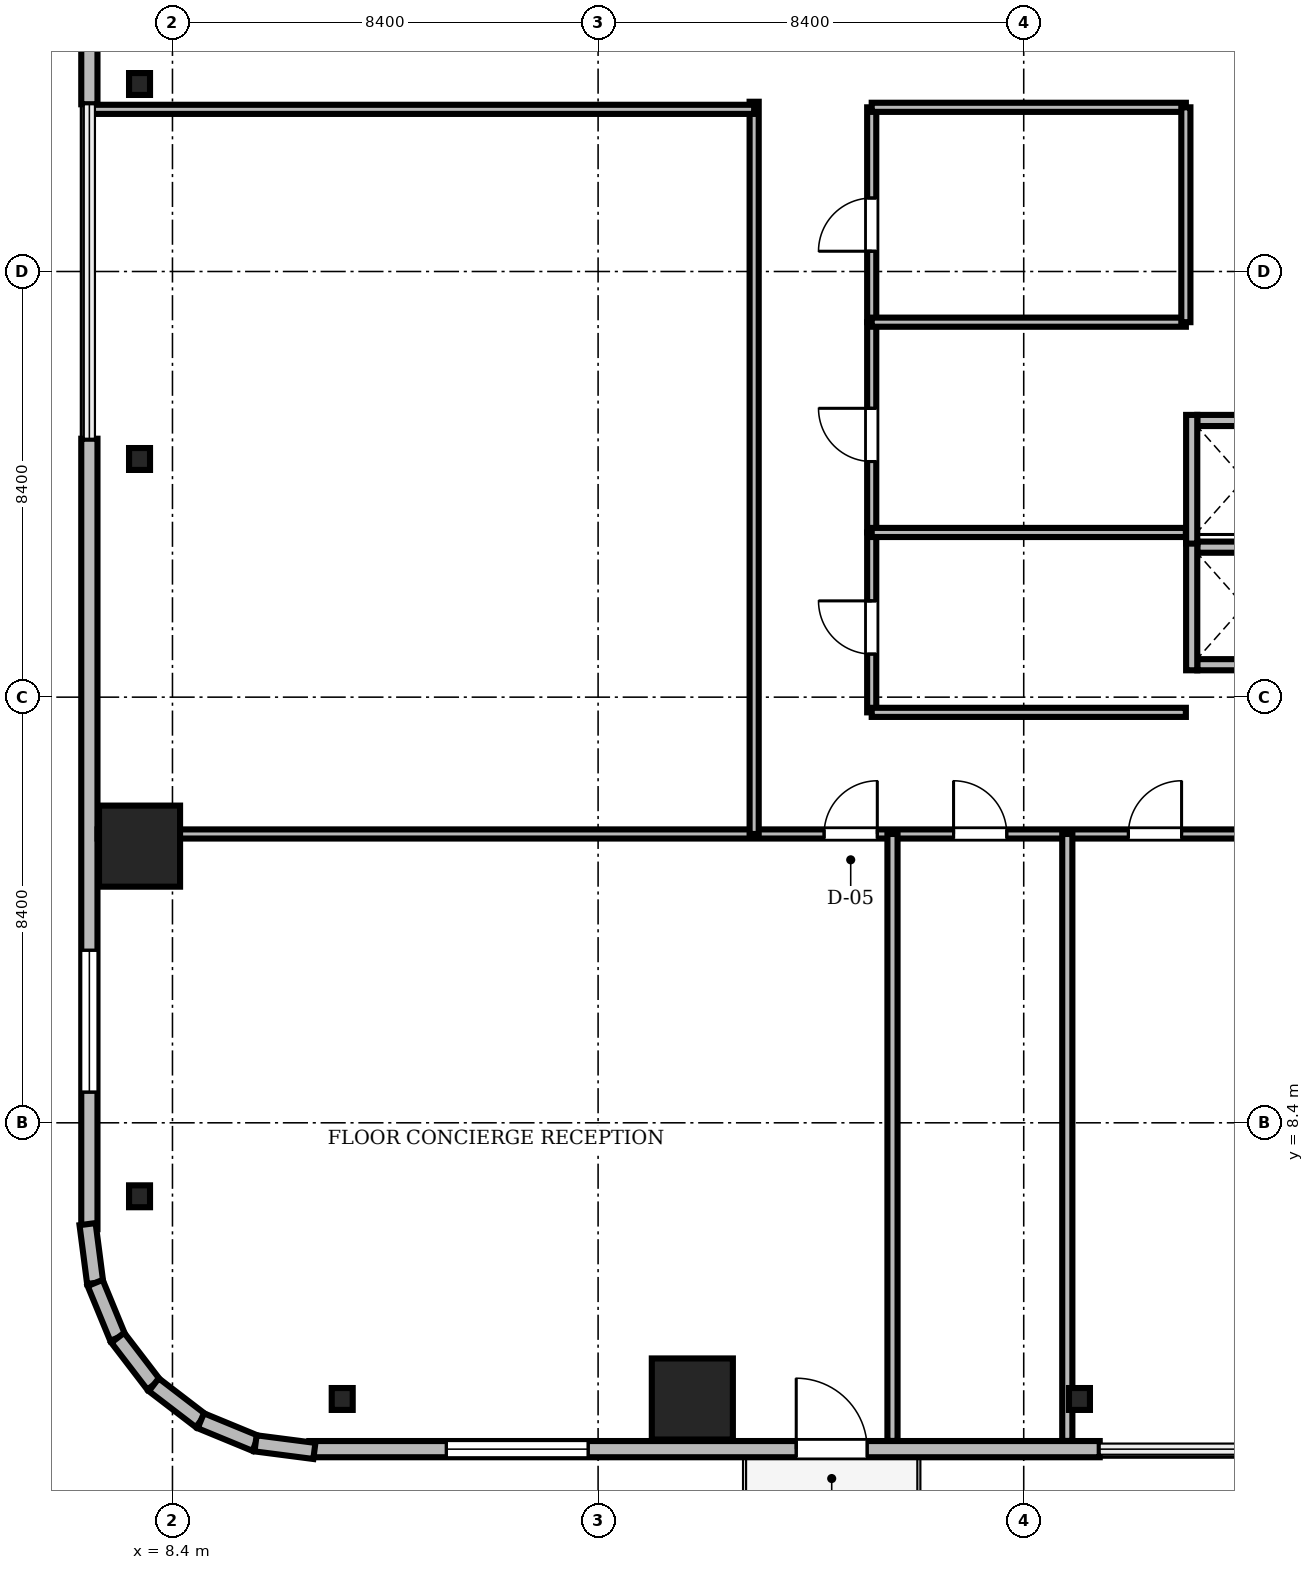
"""IFC4 building model, lengths in metres.
Left out: names, types, materials, properties, quantities, classifications, styles, units other than length and angle.
Written with IfcOpenShell. Run it as: python <this file> out.ifc"""

import sys

from ifc_helpers import new_model, si_unit, direction, frame, frame_2d, origin, origin_2d, place, context, subcontext, project, spatial, rectangle, i_section, extrude, source, transform, mapped, element, fill, save


model = new_model("IFC4")
c1 = context("Model", 3, precision=1e-05, world=origin(), true_north=direction((0.0, 1.0)))
c2 = subcontext(c1, "Body", "Model", "MODEL_VIEW")
j1 = project(units=[si_unit("LENGTHUNIT", "METRE"), si_unit("PLANEANGLEUNIT", "RADIAN")], contexts=[c1])
p1 = place(None, origin())
s1 = spatial("IfcSite", under=j1, at=p1, CompositionType="ELEMENT")
p2 = place(p1, origin())
s2 = spatial("IfcBuilding", under=s1, at=p2, CompositionType="ELEMENT")
p3 = place(p2, frame((0.0, 0.0, 126.1)))
s3 = spatial("IfcBuildingStorey", under=s2, at=p3, CompositionType="ELEMENT", Elevation=126.1)
m1 = source(origin(), c2, "Body", "SweptSolid", [
    extrude(rectangle(XDim=1.6, YDim=1.6, at=origin_2d()), origin(), (0.0, 0.0, 1.0), 3.46),
])
for number, where, z_axis, x_axis in (
    (1, (18.66, 2.95, 0.0), (0.0, 0.0, 1.0), (1.0, 0.0, 0.0)),
    (2, (7.75, 13.86, 0.0), (0.0, 0.0, 1.0), (1.0, 0.0, 0.0)),
):
    element("IfcColumn", number, at=place(p3, frame(where, z_axis=z_axis, x_axis=x_axis)), inside=s3, PredefinedType="COLUMN", context=c2, shape_type="MappedRepresentation", body=[
        mapped(m1, transform((0.0, 0.0, 0.0), scale=1.0)),
    ])
m2 = source(origin(), c2, "Body", "SweptSolid", [
    extrude(i_section(OverallWidth=0.414, OverallDepth=0.432, WebThickness=0.026, FlangeThickness=0.04, FilletRadius=0.015, at=origin_2d()), origin(), (0.0, 0.0, 1.0), 3.46),
])
for number, where, z_axis, x_axis in (
    (3, (11.75, 2.95, 0.0), (0.0, 0.0, 1.0), (1.0, 0.0, 0.0)),
    (4, (26.3, 2.95, 0.0), (0.0, 0.0, 1.0), (1.0, 0.0, 0.0)),
    (5, (7.75, 28.9, 0.0), (0.0, 0.0, 1.0), (1.0, 0.0, 0.0)),
    (6, (7.75, 21.5, 0.0), (0.0, 0.0, 1.0), (1.0, 0.0, 0.0)),
    (7, (7.75, 6.95, 0.0), (0.0, 0.0, 1.0), (1.0, 0.0, 0.0)),
):
    element("IfcColumn", number, at=place(p3, frame(where, z_axis=z_axis, x_axis=x_axis)), inside=s3, PredefinedType="COLUMN", context=c2, shape_type="MappedRepresentation", body=[
        mapped(m2, transform((0.0, 0.0, 0.0), scale=1.0)),
    ])
m3 = source(origin(), c2, "Body", "SweptSolid", [
    extrude(rectangle(XDim=15.6, YDim=0.32, at=frame_2d((7.8, 0.0))), origin(), (0.0, 0.0, 1.0), 3.46),
])
p4 = place(p3, frame((11.1, 1.96, 0.0), z_axis=(0.0, 0.0, 1.0), x_axis=(1.0, 0.0, 0.0)))
e8 = element("IfcWall", 8, at=p4, inside=s3, PredefinedType="SOLIDWALL", context=c2, shape_type="MappedRepresentation", body=[
    mapped(m3, transform((0.0, 0.0, 0.0), scale=1.0)),
])
m4 = source(origin(), c2, "Body", "SweptSolid", [
    extrude(rectangle(XDim=1.4, YDim=2.3, at=frame_2d((0.7, 1.15))), frame((0.0, 0.17, 0.0), z_axis=(0.0, -1.0, 0.0), x_axis=(1.0, 0.0, 0.0)), (0.0, 0.0, 1.0), 0.34),
])
p5 = place(p4, frame((9.61, 0.0, 0.0)))
e9 = element("IfcOpeningElement", 9, at=p5, cuts=e8, PredefinedType="OPENING", context=c2, shape_type="MappedRepresentation", body=[
    mapped(m4, transform((0.0, 0.0, 0.0), scale=1.0)),
])
m5 = source(origin(), c2, "Body", "SweptSolid", [
    extrude(rectangle(XDim=2.8, YDim=2.4, at=frame_2d((1.4, 1.2))), frame((0.0, 0.17, 0.0), z_axis=(0.0, -1.0, 0.0), x_axis=(1.0, 0.0, 0.0)), (0.0, 0.0, 1.0), 0.34),
])
p6 = place(p4, frame((2.705, 0.0, 0.72)))
e10 = element("IfcOpeningElement", 10, at=p6, cuts=e8, PredefinedType="OPENING", context=c2, shape_type="MappedRepresentation", body=[
    mapped(m5, transform((0.0, 0.0, 0.0), scale=1.0)),
])
m6 = source(origin(), c2, "Body", "SweptSolid", [
    extrude(rectangle(XDim=15.6, YDim=0.32, at=frame_2d((7.8, 0.0))), origin(), (0.0, 0.0, 1.0), 3.46),
])
p7 = place(p3, frame((6.76, 44.1, 0.0), z_axis=(0.0, 0.0, 1.0), x_axis=(0.0, -1.0, 0.0)))
e11 = element("IfcWall", 11, at=p7, inside=s3, PredefinedType="SOLIDWALL", context=c2, shape_type="MappedRepresentation", body=[
    mapped(m6, transform((0.0, 0.0, 0.0), scale=1.0)),
])
p8 = place(p7, frame((9.61, 0.0, 0.0)))
e12 = element("IfcOpeningElement", 12, at=p8, cuts=e11, PredefinedType="OPENING", context=c2, shape_type="MappedRepresentation", body=[
    mapped(m4, transform((0.0, 0.0, 0.0), scale=1.0)),
])
p9 = place(p7, frame((2.705, 0.0, 0.72)))
e13 = element("IfcOpeningElement", 13, at=p9, cuts=e11, PredefinedType="OPENING", context=c2, shape_type="MappedRepresentation", body=[
    mapped(m5, transform((0.0, 0.0, 0.0), scale=1.0)),
])
p10 = place(p3, frame((6.76, 21.9, 0.0), z_axis=(0.0, 0.0, 1.0), x_axis=(0.0, -1.0, 0.0)))
e14 = element("IfcWall", 14, at=p10, inside=s3, PredefinedType="SOLIDWALL", context=c2, shape_type="MappedRepresentation", body=[
    mapped(m3, transform((0.0, 0.0, 0.0), scale=1.0)),
])
p11 = place(p10, frame((10.095, 0.0, 0.72)))
e15 = element("IfcOpeningElement", 15, at=p11, cuts=e14, PredefinedType="OPENING", context=c2, shape_type="MappedRepresentation", body=[
    mapped(m5, transform((0.0, 0.0, 0.0), scale=1.0)),
])
m7 = source(origin(), c2, "Body", "SweptSolid", [
    extrude(rectangle(XDim=1.171, YDim=0.32, at=frame_2d((0.585, 0.0))), origin(), (0.0, 0.0, 1.0), 3.46),
])
p12 = place(p3, frame((6.724, 6.401, 0.0), z_axis=(0.0, 0.0, 1.0), x_axis=(0.128269133229, -0.991739395941, 0.0)))
e16 = element("IfcWall", 16, at=p12, inside=s3, PredefinedType="SOLIDWALL", context=c2, shape_type="MappedRepresentation", body=[
    mapped(m7, transform((0.0, 0.0, 0.0), scale=1.0)),
])
m8 = source(origin(), c2, "Body", "SweptSolid", [
    extrude(rectangle(XDim=1.169, YDim=0.32, at=frame_2d((0.584, 0.0))), origin(), (0.0, 0.0, 1.0), 3.46),
])
for number, where, z_axis, x_axis in (
    (17, (6.875, 5.24, 0.0), (0.0, 0.0, 1.0), (0.381, -0.925, 0.0)),
    (18, (7.32, 4.159, 0.0), (0.0, 0.0, 1.0), (0.608, -0.794, 0.0)),
):
    element("IfcWall", number, at=place(p3, frame(where, z_axis=z_axis, x_axis=x_axis)), inside=s3, PredefinedType="SOLIDWALL", context=c2, shape_type="MappedRepresentation", body=[
        mapped(m8, transform((0.0, 0.0, 0.0), scale=1.0)),
    ])
m9 = source(origin(), c2, "Body", "SweptSolid", [
    extrude(rectangle(XDim=1.169, YDim=0.32, at=frame_2d((0.584, 0.0))), origin(), (0.0, 0.0, 1.0), 3.46),
])
p13 = place(p3, frame((8.031, 3.231, 0.0), z_axis=(0.0, 0.0, 1.0), x_axis=(0.793663520347, -0.608356981114, 0.0)))
e19 = element("IfcWall", 19, at=p13, inside=s3, PredefinedType="SOLIDWALL", context=c2, shape_type="MappedRepresentation", body=[
    mapped(m9, transform((0.0, 0.0, 0.0), scale=1.0)),
])
m10 = source(origin(), c2, "Body", "SweptSolid", [
    extrude(rectangle(XDim=1.169, YDim=0.32, at=frame_2d((0.585, 0.0))), origin(), (0.0, 0.0, 1.0), 3.46),
])
p14 = place(p3, frame((8.959, 2.52, 0.0), z_axis=(0.0, 0.0, 1.0), x_axis=(0.924479075121, -0.381232789334, 0.0)))
e20 = element("IfcWall", 20, at=p14, inside=s3, PredefinedType="SOLIDWALL", context=c2, shape_type="MappedRepresentation", body=[
    mapped(m10, transform((0.0, 0.0, 0.0), scale=1.0)),
])
m11 = source(origin(), c2, "Body", "SweptSolid", [
    extrude(rectangle(XDim=1.17, YDim=0.32, at=frame_2d((0.585, 0.0))), origin(), (0.0, 0.0, 1.0), 3.46),
])
p15 = place(p3, frame((10.04, 2.074, 0.0), z_axis=(0.0, 0.0, 1.0), x_axis=(0.991762485493, -0.128090485085, 0.0)))
e21 = element("IfcWall", 21, at=p15, inside=s3, PredefinedType="SOLIDWALL", context=c2, shape_type="MappedRepresentation", body=[
    mapped(m11, transform((0.0, 0.0, 0.0), scale=1.0)),
])
m12 = source(origin(), c2, "Body", "SweptSolid", [
    extrude(rectangle(XDim=1.85, YDim=0.22, at=frame_2d((0.925, 0.0))), origin(), (0.0, 0.0, 1.0), 3.46),
])
for number, where, z_axis, x_axis in (
    (22, (28.625, 17.44, 0.0), (0.0, 0.0, 1.0), (1.0, 0.0, 0.0)),
    (23, (28.625, 19.76, 0.0), (0.0, 0.0, 1.0), (1.0, 0.0, 0.0)),
):
    element("IfcWall", number, at=place(p3, frame(where, z_axis=z_axis, x_axis=x_axis)), inside=s3, PredefinedType="SOLIDWALL", context=c2, shape_type="MappedRepresentation", body=[
        mapped(m12, transform((0.0, 0.0, 0.0), scale=1.0)),
    ])
m13 = source(origin(), c2, "Body", "SweptSolid", [
    extrude(rectangle(XDim=2.54, YDim=0.22, at=frame_2d((1.27, 0.0))), origin(), (0.0, 0.0, 1.0), 3.46),
])
p16 = place(p3, frame((28.515, 17.33, 0.0), z_axis=(0.0, 0.0, 1.0), x_axis=(0.0, 1.0, 0.0)))
e24 = element("IfcWall", 24, at=p16, inside=s3, PredefinedType="SOLIDWALL", context=c2, shape_type="MappedRepresentation", body=[
    mapped(m13, transform((0.0, 0.0, 0.0), scale=1.0)),
])
p17 = place(p3, frame((28.625, 22.26, 0.0), z_axis=(0.0, 0.0, 1.0), x_axis=(1.0, 0.0, 0.0)))
e25 = element("IfcWall", 25, at=p17, inside=s3, PredefinedType="SOLIDWALL", context=c2, shape_type="MappedRepresentation", body=[
    mapped(m12, transform((0.0, 0.0, 0.0), scale=1.0)),
])
p18 = place(p3, frame((28.515, 19.83, 0.0), z_axis=(0.0, 0.0, 1.0), x_axis=(0.0, 1.0, 0.0)))
e26 = element("IfcWall", 26, at=p18, inside=s3, PredefinedType="SOLIDWALL", context=c2, shape_type="MappedRepresentation", body=[
    mapped(m13, transform((0.0, 0.0, 0.0), scale=1.0)),
])
m14 = source(origin(), c2, "Body", "SweptSolid", [
    extrude(rectangle(XDim=46.156, YDim=0.18, at=frame_2d((23.078, 0.0))), origin(), (0.0, 0.0, 1.0), 2.702),
])
p19 = place(p3, frame((6.922, 14.1, 0.0), z_axis=(0.0, 0.0, 1.0), x_axis=(1.0, 0.0, 0.0)))
e27 = element("IfcWall", 27, at=p19, inside=s3, PredefinedType="PARTITIONING", context=c2, shape_type="MappedRepresentation", body=[
    mapped(m14, transform((0.0, 0.0, 0.0), scale=1.0)),
])
m15 = source(origin(), c2, "Body", "SweptSolid", [
    extrude(rectangle(XDim=1.05, YDim=2.2, at=frame_2d((0.525, 1.1))), frame((0.0, 0.1, 0.0), z_axis=(0.0, -1.0, 0.0), x_axis=(1.0, 0.0, 0.0)), (0.0, 0.0, 1.0), 0.2),
])
p20 = place(p19, frame((14.338, 0.0, 0.0)))
e28 = element("IfcOpeningElement", 28, at=p20, cuts=e27, PredefinedType="OPENING", context=c2, shape_type="MappedRepresentation", body=[
    mapped(m15, transform((0.0, 0.0, 0.0), scale=1.0)),
])
p21 = place(p19, frame((16.893, 0.0, 0.0)))
e29 = element("IfcOpeningElement", 29, at=p21, cuts=e27, PredefinedType="OPENING", context=c2, shape_type="MappedRepresentation", body=[
    mapped(m15, transform((0.0, 0.0, 0.0), scale=1.0)),
])
p22 = place(p19, frame((20.344, 0.0, 0.0)))
e30 = element("IfcOpeningElement", 30, at=p22, cuts=e27, PredefinedType="OPENING", context=c2, shape_type="MappedRepresentation", body=[
    mapped(m15, transform((0.0, 0.0, 0.0), scale=1.0)),
])
p23 = place(p19, frame((23.948, 0.0, 0.0)))
e31 = element("IfcOpeningElement", 31, at=p23, cuts=e27, PredefinedType="OPENING", context=c2, shape_type="MappedRepresentation", body=[
    mapped(m15, transform((0.0, 0.0, 0.0), scale=1.0)),
])
p24 = place(p19, frame((27.913, 0.0, 0.0)))
e32 = element("IfcOpeningElement", 32, at=p24, cuts=e27, PredefinedType="OPENING", context=c2, shape_type="MappedRepresentation", body=[
    mapped(m15, transform((0.0, 0.0, 0.0), scale=1.0)),
])
p25 = place(p19, frame((32.086, 0.0, 0.0)))
e33 = element("IfcOpeningElement", 33, at=p25, cuts=e27, PredefinedType="OPENING", context=c2, shape_type="MappedRepresentation", body=[
    mapped(m15, transform((0.0, 0.0, 0.0), scale=1.0)),
])
m16 = source(origin(), c2, "Body", "SweptSolid", [
    extrude(rectangle(XDim=0.95, YDim=2.15, at=frame_2d((0.475, 1.075))), frame((0.0, 0.1, 0.0), z_axis=(0.0, -1.0, 0.0), x_axis=(1.0, 0.0, 0.0)), (0.0, 0.0, 1.0), 0.2),
])
p26 = place(p19, frame((38.234, 0.0, 0.0)))
e34 = element("IfcOpeningElement", 34, at=p26, cuts=e27, PredefinedType="OPENING", context=c2, shape_type="MappedRepresentation", body=[
    mapped(m16, transform((0.0, 0.0, 0.0), scale=1.0)),
])
p27 = place(p19, frame((41.828, 0.0, 0.0)))
e35 = element("IfcOpeningElement", 35, at=p27, cuts=e27, PredefinedType="OPENING", context=c2, shape_type="MappedRepresentation", body=[
    mapped(m15, transform((0.0, 0.0, 0.0), scale=1.0)),
])
m17 = source(origin(), c2, "Body", "SweptSolid", [
    extrude(rectangle(XDim=4.24, YDim=0.18, at=frame_2d((2.12, 0.0))), origin(), (0.0, 0.0, 1.0), 2.852),
])
p28 = place(p3, frame((22.2, 24.2, 0.0), z_axis=(0.0, 0.0, 1.0), x_axis=(0.0, 1.0, 0.0)))
e36 = element("IfcWall", 36, at=p28, inside=s3, PredefinedType="PARTITIONING", context=c2, shape_type="MappedRepresentation", body=[
    mapped(m17, transform((0.0, 0.0, 0.0), scale=1.0)),
])
p29 = place(p28, frame((1.4, 0.0, 0.0)))
e37 = element("IfcOpeningElement", 37, at=p29, cuts=e36, PredefinedType="OPENING", context=c2, shape_type="MappedRepresentation", body=[
    mapped(m15, transform((0.0, 0.0, 0.0), scale=1.0)),
])
m18 = source(origin(), c2, "Body", "SweptSolid", [
    extrude(rectangle(XDim=4.15, YDim=0.18, at=frame_2d((2.075, 0.0))), origin(), (0.0, 0.0, 1.0), 3.122),
])
p30 = place(p3, frame((22.2, 20.05, 0.0), z_axis=(0.0, 0.0, 1.0), x_axis=(0.0, 1.0, 0.0)))
e38 = element("IfcWall", 38, at=p30, inside=s3, PredefinedType="PARTITIONING", context=c2, shape_type="MappedRepresentation", body=[
    mapped(m18, transform((0.0, 0.0, 0.0), scale=1.0)),
])
p31 = place(p30, frame((1.4, 0.0, 0.0)))
e39 = element("IfcOpeningElement", 39, at=p31, cuts=e38, PredefinedType="OPENING", context=c2, shape_type="MappedRepresentation", body=[
    mapped(m15, transform((0.0, 0.0, 0.0), scale=1.0)),
])
m19 = source(origin(), c2, "Body", "SweptSolid", [
    extrude(rectangle(XDim=3.55, YDim=0.18, at=frame_2d((1.775, 0.0))), origin(), (0.0, 0.0, 1.0), 2.852),
])
p32 = place(p3, frame((22.2, 16.5, 0.0), z_axis=(0.0, 0.0, 1.0), x_axis=(0.0, 1.0, 0.0)))
e40 = element("IfcWall", 40, at=p32, inside=s3, PredefinedType="PARTITIONING", context=c2, shape_type="MappedRepresentation", body=[
    mapped(m19, transform((0.0, 0.0, 0.0), scale=1.0)),
])
p33 = place(p32, frame((1.15, 0.0, 0.0)))
e41 = element("IfcOpeningElement", 41, at=p33, cuts=e40, PredefinedType="OPENING", context=c2, shape_type="MappedRepresentation", body=[
    mapped(m15, transform((0.0, 0.0, 0.0), scale=1.0)),
])
m20 = source(origin(), c2, "Body", "SweptSolid", [
    extrude(rectangle(XDim=14.45, YDim=0.18, at=frame_2d((7.225, 0.0))), origin(), (0.0, 0.0, 1.0), 2.852),
])
p34 = place(p3, frame((19.88, 14.1, 0.0), z_axis=(0.0, 0.0, 1.0), x_axis=(0.0, 1.0, 0.0)))
e42 = element("IfcWall", 42, at=p34, inside=s3, PredefinedType="PARTITIONING", context=c2, shape_type="MappedRepresentation", body=[
    mapped(m20, transform((0.0, 0.0, 0.0), scale=1.0)),
])
m21 = source(origin(), c2, "Body", "SweptSolid", [
    extrude(rectangle(XDim=13.15, YDim=0.18, at=frame_2d((6.575, 0.0))), origin(), (0.0, 0.0, 1.0), 2.702),
])
p35 = place(p3, frame((6.73, 28.4, 0.0), z_axis=(0.0, 0.0, 1.0), x_axis=(1.0, 0.0, 0.0)))
e43 = element("IfcWall", 43, at=p35, inside=s3, PredefinedType="PARTITIONING", context=c2, shape_type="MappedRepresentation", body=[
    mapped(m21, transform((0.0, 0.0, 0.0), scale=1.0)),
])
m22 = source(origin(), c2, "Body", "SweptSolid", [
    extrude(rectangle(XDim=11.978, YDim=0.2, at=frame_2d((5.989, 0.0))), origin(), (0.0, 0.0, 1.0), 2.702),
])
for number, where, z_axis, x_axis in (
    (44, (22.61, 2.122, 0.0), (0.0, 0.0, 1.0), (0.0, 1.0, 0.0)),
    (45, (26.06, 2.122, 0.0), (0.0, 0.0, 1.0), (0.0, 1.0, 0.0)),
):
    element("IfcWall", number, at=place(p3, frame(where, z_axis=z_axis, x_axis=x_axis)), inside=s3, PredefinedType="PARTITIONING", context=c2, shape_type="MappedRepresentation", body=[
        mapped(m22, transform((0.0, 0.0, 0.0), scale=1.0)),
    ])
m23 = source(origin(), c2, "Body", "SweptSolid", [
    extrude(rectangle(XDim=6.2, YDim=0.18, at=frame_2d((3.1, 0.0))), origin(), (0.0, 0.0, 1.0), 3.46),
])
for number, where, z_axis, x_axis in (
    (46, (22.2, 16.5, 0.0), (0.0, 0.0, 1.0), (1.0, 0.0, 0.0)),
    (47, (22.2, 20.05, 0.0), (0.0, 0.0, 1.0), (1.0, 0.0, 0.0)),
    (48, (22.2, 24.2, 0.0), (0.0, 0.0, 1.0), (1.0, 0.0, 0.0)),
    (49, (22.2, 28.44, 0.0), (0.0, 0.0, 1.0), (1.0, 0.0, 0.0)),
):
    element("IfcWall", number, at=place(p3, frame(where, z_axis=z_axis, x_axis=x_axis)), inside=s3, PredefinedType="PARTITIONING", context=c2, shape_type="MappedRepresentation", body=[
        mapped(m23, transform((0.0, 0.0, 0.0), scale=1.0)),
    ])
p36 = place(p3, frame((28.4, 24.2, 0.0), z_axis=(0.0, 0.0, 1.0), x_axis=(0.0, 1.0, 0.0)))
e50 = element("IfcWall", 50, at=p36, inside=s3, PredefinedType="PARTITIONING", context=c2, shape_type="MappedRepresentation", body=[
    mapped(m17, transform((0.0, 0.0, 0.0), scale=1.0)),
])
m24 = source(origin(), c2, "Body", "SweptSolid", [
    extrude(rectangle(XDim=1.4, YDim=2.3, at=frame_2d((0.7, 1.15))), frame((0.0, 0.025, 0.0), z_axis=(0.0, -1.0, 0.0), x_axis=(1.0, 0.0, 0.0)), (0.0, 0.0, 1.0), 0.05),
])
p37 = place(p5, frame((1.4, 0.0, 0.0), z_axis=(0.0, 0.0, 1.0), x_axis=(-1.0, 0.0, 0.0)))
e51 = element("IfcDoor", 51, at=p37, inside=s3, OperationType="DOUBLE_DOOR_SLIDING", PredefinedType="DOOR", context=c2, shape_type="MappedRepresentation", body=[
    mapped(m24, transform((0.0, 0.0, 0.0), scale=1.0)),
])
fill(e9, e51)
m25 = source(origin(), c2, "Body", "SweptSolid", [
    extrude(rectangle(XDim=2.8, YDim=2.4, at=frame_2d((1.4, 1.2))), frame((0.0, 0.03, 0.0), z_axis=(0.0, -1.0, 0.0), x_axis=(1.0, 0.0, 0.0)), (0.0, 0.0, 1.0), 0.06),
])
p38 = place(p6, origin())
e52 = element("IfcWindow", 52, at=p38, inside=s3, PartitioningType="SINGLE_PANEL", PredefinedType="WINDOW", context=c2, shape_type="MappedRepresentation", body=[
    mapped(m25, transform((0.0, 0.0, 0.0), scale=1.0)),
])
fill(e10, e52)
p39 = place(p11, origin())
e53 = element("IfcWindow", 53, at=p39, inside=s3, PartitioningType="SINGLE_PANEL", PredefinedType="WINDOW", context=c2, shape_type="MappedRepresentation", body=[
    mapped(m25, transform((0.0, 0.0, 0.0), scale=1.0)),
])
fill(e15, e53)
m26 = source(origin(), c2, "Body", "SweptSolid", [
    extrude(rectangle(XDim=1.05, YDim=2.2, at=frame_2d((0.525, 1.1))), frame((0.0, 0.025, 0.0), z_axis=(0.0, -1.0, 0.0), x_axis=(1.0, 0.0, 0.0)), (0.0, 0.0, 1.0), 0.05),
])
p40 = place(p20, origin())
e54 = element("IfcDoor", 54, at=p40, inside=s3, OperationType="SINGLE_SWING_RIGHT", PredefinedType="DOOR", context=c2, shape_type="MappedRepresentation", body=[
    mapped(m26, transform((0.0, 0.0, 0.0), scale=1.0)),
])
fill(e28, e54)
p41 = place(p21, origin())
e55 = element("IfcDoor", 55, at=p41, inside=s3, OperationType="SINGLE_SWING_LEFT", PredefinedType="DOOR", context=c2, shape_type="MappedRepresentation", body=[
    mapped(m26, transform((0.0, 0.0, 0.0), scale=1.0)),
])
fill(e29, e55)
p42 = place(p22, origin())
e56 = element("IfcDoor", 56, at=p42, inside=s3, OperationType="SINGLE_SWING_RIGHT", PredefinedType="DOOR", context=c2, shape_type="MappedRepresentation", body=[
    mapped(m26, transform((0.0, 0.0, 0.0), scale=1.0)),
])
fill(e30, e56)
p43 = place(p29, origin())
e57 = element("IfcDoor", 57, at=p43, inside=s3, OperationType="SINGLE_SWING_LEFT", PredefinedType="DOOR", context=c2, shape_type="MappedRepresentation", body=[
    mapped(m26, transform((0.0, 0.0, 0.0), scale=1.0)),
])
fill(e37, e57)
p44 = place(p31, origin())
e58 = element("IfcDoor", 58, at=p44, inside=s3, OperationType="SINGLE_SWING_RIGHT", PredefinedType="DOOR", context=c2, shape_type="MappedRepresentation", body=[
    mapped(m26, transform((0.0, 0.0, 0.0), scale=1.0)),
])
fill(e39, e58)
p45 = place(p33, origin())
e59 = element("IfcDoor", 59, at=p45, inside=s3, OperationType="SINGLE_SWING_RIGHT", PredefinedType="DOOR", context=c2, shape_type="MappedRepresentation", body=[
    mapped(m26, transform((0.0, 0.0, 0.0), scale=1.0)),
])
fill(e41, e59)
save(model, sys.argv[1])
